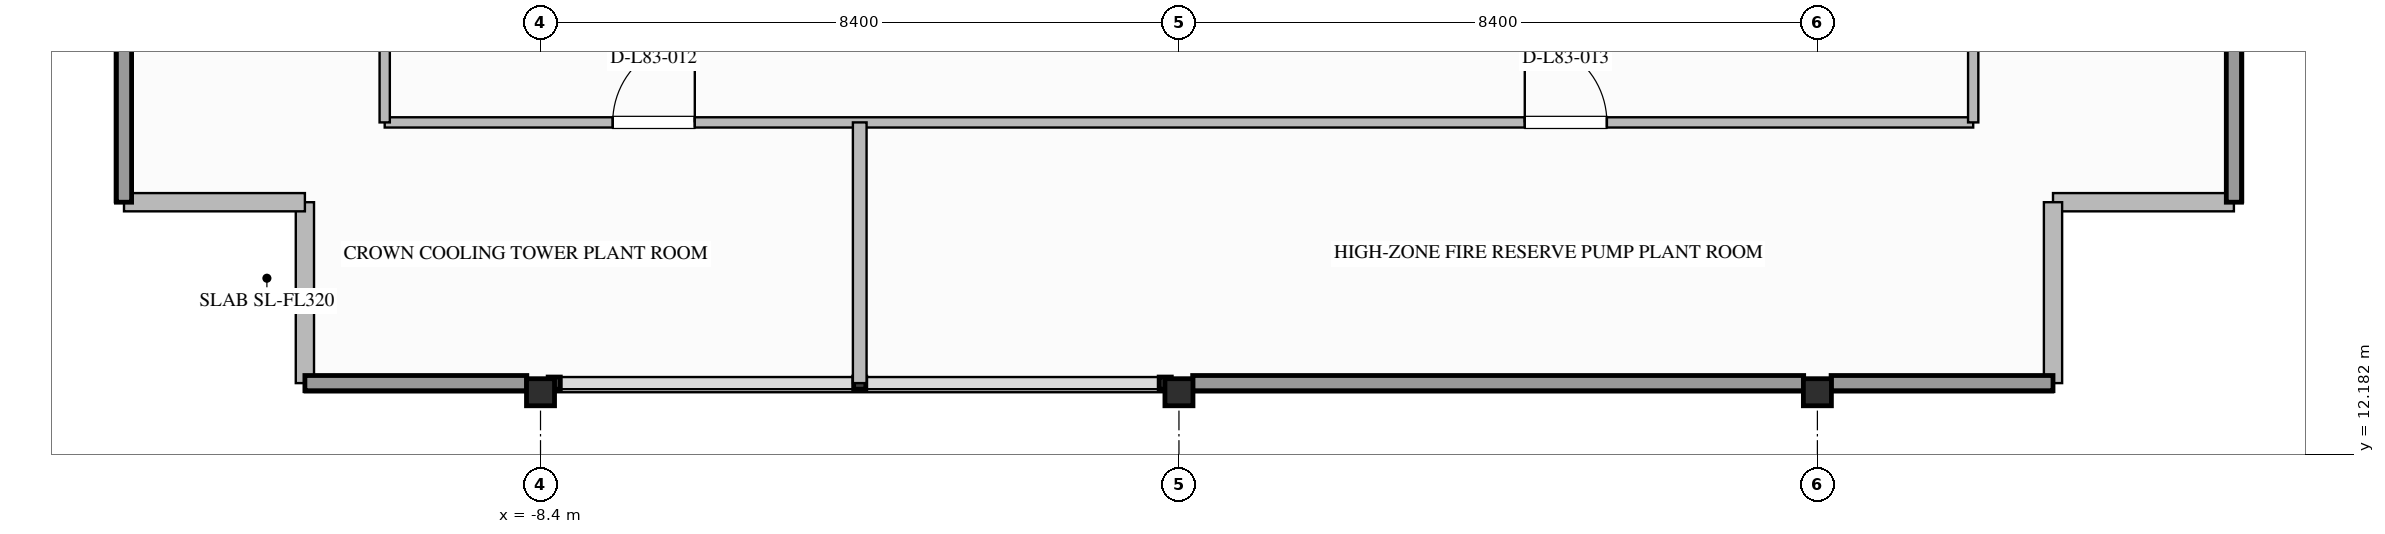
"""IFC4 building model, lengths in metres.
Left out: names, types, materials, properties, quantities, classifications, styles, units other than length and angle.
Written with IfcOpenShell. Run it as: python <this file> out.ifc"""

import sys

from ifc_helpers import new_model, si_unit, direction, frame, frame_2d, origin, origin_2d, place, context, subcontext, project, spatial, rectangle, i_section, extrude, element, fill, save


model = new_model("IFC4")
c1 = context("Model", 3, precision=1e-05, world=origin(), true_north=direction((0.0, 1.0)))
c2 = subcontext(c1, "Body", "Model", "MODEL_VIEW")
j1 = project(units=[si_unit("LENGTHUNIT", "METRE"), si_unit("PLANEANGLEUNIT", "RADIAN")], contexts=[c1])
p1 = place(None, origin())
s1 = spatial("IfcSite", under=j1, at=p1, CompositionType="ELEMENT")
p2 = place(p1, origin())
s2 = spatial("IfcBuilding", under=s1, at=p2, CompositionType="ELEMENT")
p3 = place(p2, frame((0.0, 0.0, 319.4)))
s3 = spatial("IfcBuildingStorey", under=s2, at=p3, CompositionType="ELEMENT", Elevation=319.4)
for number, where, z_axis, x_axis in (
    (1, (-8.4, 13.0, 0.0), (0.0, 0.0, 1.0), (1.0, 0.0, 0.0)),
    (2, (0.0, 13.0, 0.0), (0.0, 0.0, 1.0), (1.0, 0.0, 0.0)),
    (3, (8.4, 13.0, 0.0), (0.0, 0.0, 1.0), (1.0, 0.0, 0.0)),
):
    element("IfcColumn", number, at=place(p3, frame(where, z_axis=z_axis, x_axis=x_axis)), inside=s3, PredefinedType="COLUMN", context=c2, shape_type="SweptSolid", body=[
        extrude(i_section(OverallWidth=0.369, OverallDepth=0.356, WebThickness=0.011, FlangeThickness=0.018, FilletRadius=0.025, at=origin_2d()), origin(), (0.0, 0.0, 1.0), 3.797),
    ])
for number, where, z_axis, x_axis in (
    (4, (-11.5, 13.12, 0.0), (0.0, 0.0, 1.0), (0.0, 1.0, 0.0)),
    (5, (-11.5, 15.5, 0.0), (0.0, 0.0, 1.0), (-1.0, 0.0, 0.0)),
    (6, (13.88, 15.5, 0.0), (0.0, 0.0, 1.0), (-1.0, 0.0, 0.0)),
    (7, (11.5, 15.5, 0.0), (0.0, 0.0, 1.0), (0.0, -1.0, 0.0)),
):
    element("IfcWall", number, at=place(p3, frame(where, z_axis=z_axis, x_axis=x_axis)), inside=s3, PredefinedType="STANDARD", context=c2, shape_type="SweptSolid", body=[
        extrude(rectangle(XDim=2.38, YDim=0.24, at=frame_2d((1.19, 0.0))), origin(), (0.0, 0.0, 1.0), 3.48),
    ])
p4 = place(p3, frame((-10.45, 16.55, 0.0), z_axis=(0.0, 0.0, 1.0), x_axis=(1.0, 0.0, 0.0)))
e8 = element("IfcWall", 8, at=p4, inside=s3, PredefinedType="PARTITIONING", context=c2, shape_type="SweptSolid", body=[
    extrude(rectangle(XDim=20.9, YDim=0.135, at=frame_2d((10.45, 0.0))), origin(), (0.0, 0.0, 1.0), 3.48),
])
p5 = place(p4, frame((3.0, 0.0, 0.0)))
e9 = element("IfcOpeningElement", 9, at=p5, cuts=e8, PredefinedType="OPENING", context=c2, shape_type="SweptSolid", body=[
    extrude(rectangle(XDim=1.08, YDim=2.04, at=frame_2d((0.54, 1.02))), frame((0.0, 0.077, 0.0), z_axis=(0.0, -1.0, 0.0), x_axis=(1.0, 0.0, 0.0)), (0.0, 0.0, 1.0), 0.155),
])
p6 = place(p4, frame((15.0, 0.0, 0.0)))
e10 = element("IfcOpeningElement", 10, at=p6, cuts=e8, PredefinedType="OPENING", context=c2, shape_type="SweptSolid", body=[
    extrude(rectangle(XDim=1.08, YDim=2.04, at=frame_2d((0.54, 1.02))), frame((0.0, 0.077, 0.0), z_axis=(0.0, -1.0, 0.0), x_axis=(1.0, 0.0, 0.0)), (0.0, 0.0, 1.0), 0.155),
])
p7 = place(p3, frame((-10.45, 16.55, 0.0), z_axis=(0.0, 0.0, 1.0), x_axis=(0.0, 1.0, 0.0)))
e11 = element("IfcWall", 11, at=p7, inside=s3, PredefinedType="PARTITIONING", context=c2, shape_type="SweptSolid", body=[
    extrude(rectangle(XDim=20.9, YDim=0.135, at=frame_2d((10.45, 0.0))), origin(), (0.0, 0.0, 1.0), 3.48),
])
p8 = place(p7, frame((8.0, 0.0, 0.0)))
e12 = element("IfcOpeningElement", 12, at=p8, cuts=e11, PredefinedType="OPENING", context=c2, shape_type="SweptSolid", body=[
    extrude(rectangle(XDim=1.08, YDim=2.04, at=frame_2d((0.54, 1.02))), frame((0.0, 0.077, 0.0), z_axis=(0.0, -1.0, 0.0), x_axis=(1.0, 0.0, 0.0)), (0.0, 0.0, 1.0), 0.155),
])
p9 = place(p3, frame((10.45, 16.55, 0.0), z_axis=(0.0, 0.0, 1.0), x_axis=(0.0, 1.0, 0.0)))
e13 = element("IfcWall", 13, at=p9, inside=s3, PredefinedType="PARTITIONING", context=c2, shape_type="SweptSolid", body=[
    extrude(rectangle(XDim=20.9, YDim=0.135, at=frame_2d((10.45, 0.0))), origin(), (0.0, 0.0, 1.0), 3.48),
])
p10 = place(p9, frame((8.0, 0.0, 0.0)))
e14 = element("IfcOpeningElement", 14, at=p10, cuts=e13, PredefinedType="OPENING", context=c2, shape_type="SweptSolid", body=[
    extrude(rectangle(XDim=1.08, YDim=2.04, at=frame_2d((0.54, 1.02))), frame((0.0, 0.077, 0.0), z_axis=(0.0, -1.0, 0.0), x_axis=(1.0, 0.0, 0.0)), (0.0, 0.0, 1.0), 0.155),
])
p11 = place(p3, frame((-4.2, 13.12, 0.0), z_axis=(0.0, 0.0, 1.0), x_axis=(0.0, 1.0, 0.0)))
e15 = element("IfcWall", 15, at=p11, inside=s3, PredefinedType="SOLIDWALL", context=c2, shape_type="SweptSolid", body=[
    extrude(rectangle(XDim=3.43, YDim=0.18, at=frame_2d((1.715, 0.0))), origin(), (0.0, 0.0, 1.0), 3.48),
])
p12 = place(p5, origin())
e16 = element("IfcDoor", 16, at=p12, inside=s3, OperationType="SINGLE_SWING_RIGHT", PredefinedType="DOOR", context=c2, shape_type="SweptSolid", body=[
    extrude(rectangle(XDim=1.08, YDim=2.04, at=frame_2d((0.54, 1.02))), frame((0.0, 0.025, 0.0), z_axis=(0.0, -1.0, 0.0), x_axis=(1.0, 0.0, 0.0)), (0.0, 0.0, 1.0), 0.05),
])
fill(e9, e16)
p13 = place(p6, origin())
e17 = element("IfcDoor", 17, at=p13, inside=s3, OperationType="SINGLE_SWING_LEFT", PredefinedType="DOOR", context=c2, shape_type="SweptSolid", body=[
    extrude(rectangle(XDim=1.08, YDim=2.04, at=frame_2d((0.54, 1.02))), frame((0.0, 0.025, 0.0), z_axis=(0.0, -1.0, 0.0), x_axis=(1.0, 0.0, 0.0)), (0.0, 0.0, 1.0), 0.05),
])
fill(e10, e17)
save(model, sys.argv[1])
